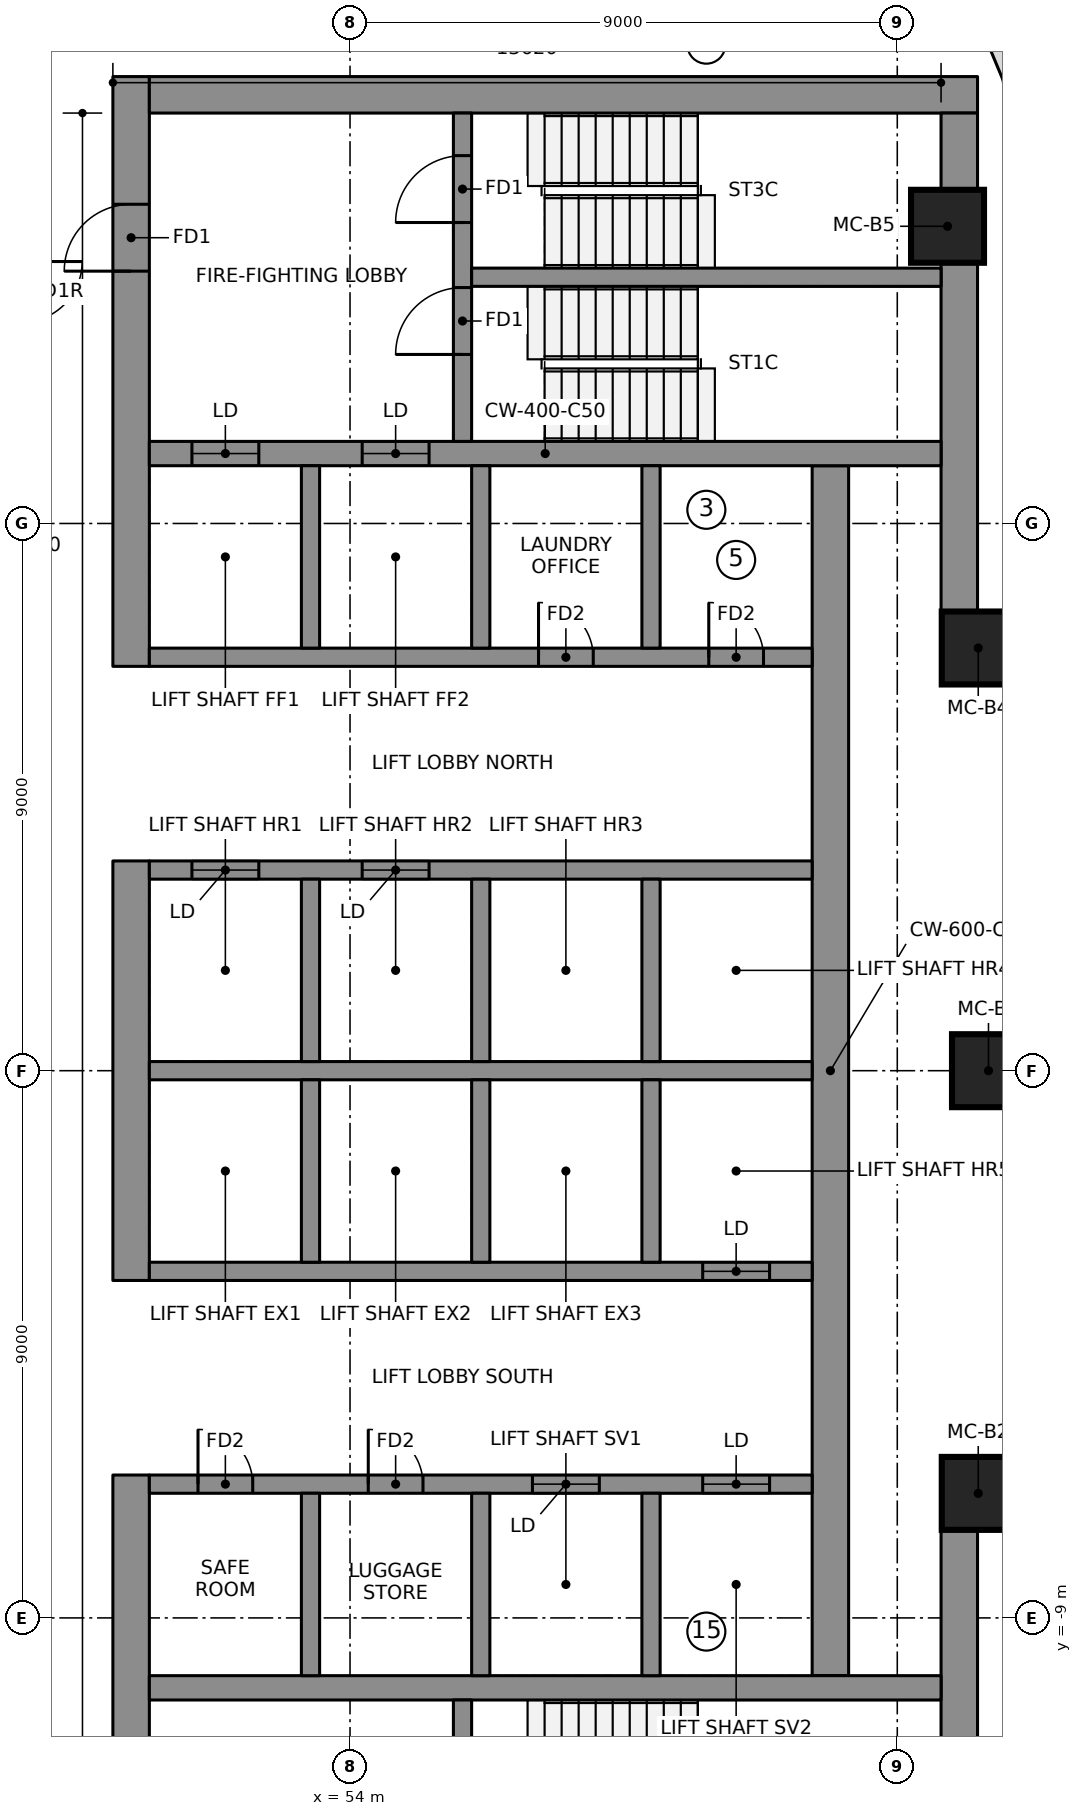
"""IFC4 building model, lengths in metres.
Left out: names, types, materials, properties, quantities, classifications, styles, units other than length and angle.
Written with IfcOpenShell. Run it as: python <this file> out.ifc"""

import sys

from ifc_helpers import new_model, si_unit, direction, frame, frame_2d, origin, origin_2d, place, context, subcontext, project, spatial, polyline, rectangle, outline, extrude, element, fill, save


model = new_model("IFC4")
c1 = context("Model", 3, precision=1e-05, world=origin(), true_north=direction((0.0, 1.0)))
c2 = subcontext(c1, "Body", "Model", "MODEL_VIEW")
j1 = project(units=[si_unit("LENGTHUNIT", "METRE"), si_unit("PLANEANGLEUNIT", "RADIAN")], contexts=[c1])
p1 = place(None, origin())
s1 = spatial("IfcSite", under=j1, at=p1, CompositionType="ELEMENT")
p2 = place(p1, origin())
s2 = spatial("IfcBuilding", under=s1, at=p2, CompositionType="ELEMENT")
p3 = place(p2, frame((0.0, 0.0, 220.8)))
s3 = spatial("IfcBuildingStorey", under=s2, at=p3, CompositionType="ELEMENT", Elevation=220.8)
p4 = place(p3, frame((50.4, 6.65, 0.0), z_axis=(0.0, 0.0, 1.0), x_axis=(0.0, 1.0, 0.0)))
e1 = element("IfcWall", 1, at=p4, inside=s3, PredefinedType="SHEAR", context=c2, shape_type="SweptSolid", body=[
    extrude(rectangle(XDim=9.7, YDim=0.6, at=frame_2d((4.85, 0.0))), origin(), (0.0, 0.0, 1.0), 3.55),
])
p5 = place(p4, frame((6.5, 0.0, 0.0)))
e2 = element("IfcOpeningElement", 2, at=p5, cuts=e1, PredefinedType="OPENING", context=c2, shape_type="SweptSolid", body=[
    extrude(rectangle(XDim=1.1, YDim=2.1, at=frame_2d((0.55, 1.05))), frame((0.0, 0.31, 0.0), z_axis=(0.0, -1.0, 0.0), x_axis=(1.0, 0.0, 0.0)), (0.0, 0.0, 1.0), 0.62),
])
p6 = place(p3, frame((50.4, -3.45, 0.0), z_axis=(0.0, 0.0, 1.0), x_axis=(0.0, 1.0, 0.0)))
e3 = element("IfcWall", 3, at=p6, inside=s3, PredefinedType="SHEAR", context=c2, shape_type="SweptSolid", body=[
    extrude(rectangle(XDim=6.9, YDim=0.6, at=frame_2d((3.45, 0.0))), origin(), (0.0, 0.0, 1.0), 3.55),
])
p7 = place(p3, frame((50.4, -16.35, 0.0), z_axis=(0.0, 0.0, 1.0), x_axis=(0.0, 1.0, 0.0)))
e4 = element("IfcWall", 4, at=p7, inside=s3, PredefinedType="SHEAR", context=c2, shape_type="SweptSolid", body=[
    extrude(rectangle(XDim=9.7, YDim=0.6, at=frame_2d((4.85, 0.0))), origin(), (0.0, 0.0, 1.0), 3.55),
])
p8 = place(p7, frame((2.1, 0.0, 0.0)))
e5 = element("IfcOpeningElement", 5, at=p8, cuts=e4, PredefinedType="OPENING", context=c2, shape_type="SweptSolid", body=[
    extrude(rectangle(XDim=1.1, YDim=2.1, at=frame_2d((0.55, 1.05))), frame((0.0, 0.31, 0.0), z_axis=(0.0, -1.0, 0.0), x_axis=(1.0, 0.0, 0.0)), (0.0, 0.0, 1.0), 0.62),
])
p9 = place(p3, frame((50.7, 16.05, 0.0), z_axis=(0.0, 0.0, 1.0), x_axis=(1.0, 0.0, 0.0)))
e6 = element("IfcWall", 6, at=p9, inside=s3, PredefinedType="SHEAR", context=c2, shape_type="SweptSolid", body=[
    extrude(rectangle(XDim=13.62, YDim=0.6, at=frame_2d((6.81, 0.0))), origin(), (0.0, 0.0, 1.0), 3.55),
])
for number, where, z_axis, x_axis in (
    (7, (64.02, 7.502, 0.0), (0.0, 0.0, 1.0), (0.0, 1.0, 0.0)),
    (8, (64.02, -15.75, 0.0), (0.0, 0.0, 1.0), (0.0, 1.0, 0.0)),
):
    element("IfcWall", number, at=place(p3, frame(where, z_axis=z_axis, x_axis=x_axis)), inside=s3, PredefinedType="SHEAR", context=c2, shape_type="SweptSolid", body=[
        extrude(rectangle(XDim=8.248, YDim=0.6, at=frame_2d((4.124, 0.0))), origin(), (0.0, 0.0, 1.0), 3.55),
    ])
p10 = place(p3, frame((61.9, -9.95, 0.0), z_axis=(0.0, 0.0, 1.0), x_axis=(0.0, 1.0, 0.0)))
e9 = element("IfcWall", 9, at=p10, inside=s3, PredefinedType="SHEAR", context=c2, shape_type="SweptSolid", body=[
    extrude(rectangle(XDim=19.9, YDim=0.6, at=frame_2d((9.95, 0.0))), origin(), (0.0, 0.0, 1.0), 3.55),
])
p11 = place(p3, frame((50.7, 10.15, 0.0), z_axis=(0.0, 0.0, 1.0), x_axis=(1.0, 0.0, 0.0)))
e10 = element("IfcWall", 10, at=p11, inside=s3, PredefinedType="SHEAR", context=c2, shape_type="SweptSolid", body=[
    extrude(rectangle(XDim=13.02, YDim=0.4, at=frame_2d((6.51, 0.0))), origin(), (0.0, 0.0, 1.0), 3.55),
])
p12 = place(p11, frame((0.7, 0.0, 0.0)))
e11 = element("IfcOpeningElement", 11, at=p12, cuts=e10, PredefinedType="OPENING", context=c2, shape_type="SweptSolid", body=[
    extrude(rectangle(XDim=1.1, YDim=2.1, at=frame_2d((0.55, 1.05))), frame((0.0, 0.21, 0.0), z_axis=(0.0, -1.0, 0.0), x_axis=(1.0, 0.0, 0.0)), (0.0, 0.0, 1.0), 0.42),
])
p13 = place(p11, frame((3.5, 0.0, 0.0)))
e12 = element("IfcOpeningElement", 12, at=p13, cuts=e10, PredefinedType="OPENING", context=c2, shape_type="SweptSolid", body=[
    extrude(rectangle(XDim=1.1, YDim=2.1, at=frame_2d((0.55, 1.05))), frame((0.0, 0.21, 0.0), z_axis=(0.0, -1.0, 0.0), x_axis=(1.0, 0.0, 0.0)), (0.0, 0.0, 1.0), 0.42),
])
p14 = place(p3, frame((50.7, -10.15, 0.0), z_axis=(0.0, 0.0, 1.0), x_axis=(1.0, 0.0, 0.0)))
e13 = element("IfcWall", 13, at=p14, inside=s3, PredefinedType="SHEAR", context=c2, shape_type="SweptSolid", body=[
    extrude(rectangle(XDim=13.02, YDim=0.4, at=frame_2d((6.51, 0.0))), origin(), (0.0, 0.0, 1.0), 3.55),
])
p15 = place(p3, frame((50.7, 0.0, 0.0), z_axis=(0.0, 0.0, 1.0), x_axis=(1.0, 0.0, 0.0)))
e14 = element("IfcWall", 14, at=p15, inside=s3, PredefinedType="SHEAR", context=c2, shape_type="SweptSolid", body=[
    extrude(rectangle(XDim=10.9, YDim=0.3, at=frame_2d((5.45, 0.0))), origin(), (0.0, 0.0, 1.0), 3.55),
])
p16 = place(p3, frame((50.7, 3.3, 0.0), z_axis=(0.0, 0.0, 1.0), x_axis=(1.0, 0.0, 0.0)))
e15 = element("IfcWall", 15, at=p16, inside=s3, PredefinedType="SHEAR", context=c2, shape_type="SweptSolid", body=[
    extrude(rectangle(XDim=10.9, YDim=0.3, at=frame_2d((5.45, 0.0))), origin(), (0.0, 0.0, 1.0), 3.55),
])
p17 = place(p16, frame((0.7, 0.0, 0.0)))
e16 = element("IfcOpeningElement", 16, at=p17, cuts=e15, PredefinedType="OPENING", context=c2, shape_type="SweptSolid", body=[
    extrude(rectangle(XDim=1.1, YDim=2.1, at=frame_2d((0.55, 1.05))), frame((0.0, 0.16, 0.0), z_axis=(0.0, -1.0, 0.0), x_axis=(1.0, 0.0, 0.0)), (0.0, 0.0, 1.0), 0.32),
])
p18 = place(p16, frame((3.5, 0.0, 0.0)))
e17 = element("IfcOpeningElement", 17, at=p18, cuts=e15, PredefinedType="OPENING", context=c2, shape_type="SweptSolid", body=[
    extrude(rectangle(XDim=1.1, YDim=2.1, at=frame_2d((0.55, 1.05))), frame((0.0, 0.16, 0.0), z_axis=(0.0, -1.0, 0.0), x_axis=(1.0, 0.0, 0.0)), (0.0, 0.0, 1.0), 0.32),
])
p19 = place(p3, frame((50.7, 6.8, 0.0), z_axis=(0.0, 0.0, 1.0), x_axis=(1.0, 0.0, 0.0)))
e18 = element("IfcWall", 18, at=p19, inside=s3, PredefinedType="SHEAR", context=c2, shape_type="SweptSolid", body=[
    extrude(rectangle(XDim=10.9, YDim=0.3, at=frame_2d((5.45, 0.0))), origin(), (0.0, 0.0, 1.0), 3.55),
])
p20 = place(p19, frame((6.4, 0.0, 0.0)))
e19 = element("IfcOpeningElement", 19, at=p20, cuts=e18, PredefinedType="OPENING", context=c2, shape_type="SweptSolid", body=[
    extrude(rectangle(XDim=0.9, YDim=2.1, at=frame_2d((0.45, 1.05))), frame((0.0, 0.16, 0.0), z_axis=(0.0, -1.0, 0.0), x_axis=(1.0, 0.0, 0.0)), (0.0, 0.0, 1.0), 0.32),
])
p21 = place(p19, frame((9.2, 0.0, 0.0)))
e20 = element("IfcOpeningElement", 20, at=p21, cuts=e18, PredefinedType="OPENING", context=c2, shape_type="SweptSolid", body=[
    extrude(rectangle(XDim=0.9, YDim=2.1, at=frame_2d((0.45, 1.05))), frame((0.0, 0.16, 0.0), z_axis=(0.0, -1.0, 0.0), x_axis=(1.0, 0.0, 0.0)), (0.0, 0.0, 1.0), 0.32),
])
for number, where, z_axis, x_axis in (
    (21, (53.35, 0.15, 0.0), (0.0, 0.0, 1.0), (0.0, 1.0, 0.0)),
    (22, (53.35, 6.95, 0.0), (0.0, 0.0, 1.0), (0.0, 1.0, 0.0)),
    (23, (56.15, 0.15, 0.0), (0.0, 0.0, 1.0), (0.0, 1.0, 0.0)),
    (24, (56.15, 6.95, 0.0), (0.0, 0.0, 1.0), (0.0, 1.0, 0.0)),
    (25, (58.95, 0.15, 0.0), (0.0, 0.0, 1.0), (0.0, 1.0, 0.0)),
    (26, (58.95, 6.95, 0.0), (0.0, 0.0, 1.0), (0.0, 1.0, 0.0)),
):
    element("IfcWall", number, at=place(p3, frame(where, z_axis=z_axis, x_axis=x_axis)), inside=s3, PredefinedType="SHEAR", context=c2, shape_type="SweptSolid", body=[
        extrude(rectangle(XDim=3.0, YDim=0.3, at=frame_2d((1.5, 0.0))), origin(), (0.0, 0.0, 1.0), 3.55),
    ])
p22 = place(p3, frame((50.7, -3.3, 0.0), z_axis=(0.0, 0.0, 1.0), x_axis=(1.0, 0.0, 0.0)))
e27 = element("IfcWall", 27, at=p22, inside=s3, PredefinedType="SHEAR", context=c2, shape_type="SweptSolid", body=[
    extrude(rectangle(XDim=10.9, YDim=0.3, at=frame_2d((5.45, 0.0))), origin(), (0.0, 0.0, 1.0), 3.55),
])
p23 = place(p22, frame((9.1, 0.0, 0.0)))
e28 = element("IfcOpeningElement", 28, at=p23, cuts=e27, PredefinedType="OPENING", context=c2, shape_type="SweptSolid", body=[
    extrude(rectangle(XDim=1.1, YDim=2.1, at=frame_2d((0.55, 1.05))), frame((0.0, 0.16, 0.0), z_axis=(0.0, -1.0, 0.0), x_axis=(1.0, 0.0, 0.0)), (0.0, 0.0, 1.0), 0.32),
])
p24 = place(p3, frame((50.7, -6.8, 0.0), z_axis=(0.0, 0.0, 1.0), x_axis=(1.0, 0.0, 0.0)))
e29 = element("IfcWall", 29, at=p24, inside=s3, PredefinedType="SHEAR", context=c2, shape_type="SweptSolid", body=[
    extrude(rectangle(XDim=10.9, YDim=0.3, at=frame_2d((5.45, 0.0))), origin(), (0.0, 0.0, 1.0), 3.55),
])
p25 = place(p24, frame((6.3, 0.0, 0.0)))
e30 = element("IfcOpeningElement", 30, at=p25, cuts=e29, PredefinedType="OPENING", context=c2, shape_type="SweptSolid", body=[
    extrude(rectangle(XDim=1.1, YDim=2.1, at=frame_2d((0.55, 1.05))), frame((0.0, 0.16, 0.0), z_axis=(0.0, -1.0, 0.0), x_axis=(1.0, 0.0, 0.0)), (0.0, 0.0, 1.0), 0.32),
])
p26 = place(p24, frame((9.1, 0.0, 0.0)))
e31 = element("IfcOpeningElement", 31, at=p26, cuts=e29, PredefinedType="OPENING", context=c2, shape_type="SweptSolid", body=[
    extrude(rectangle(XDim=1.1, YDim=2.1, at=frame_2d((0.55, 1.05))), frame((0.0, 0.16, 0.0), z_axis=(0.0, -1.0, 0.0), x_axis=(1.0, 0.0, 0.0)), (0.0, 0.0, 1.0), 0.32),
])
p27 = place(p24, frame((0.8, 0.0, 0.0)))
e32 = element("IfcOpeningElement", 32, at=p27, cuts=e29, PredefinedType="OPENING", context=c2, shape_type="SweptSolid", body=[
    extrude(rectangle(XDim=0.9, YDim=2.1, at=frame_2d((0.45, 1.05))), frame((0.0, 0.16, 0.0), z_axis=(0.0, -1.0, 0.0), x_axis=(1.0, 0.0, 0.0)), (0.0, 0.0, 1.0), 0.32),
])
p28 = place(p24, frame((3.6, 0.0, 0.0)))
e33 = element("IfcOpeningElement", 33, at=p28, cuts=e29, PredefinedType="OPENING", context=c2, shape_type="SweptSolid", body=[
    extrude(rectangle(XDim=0.9, YDim=2.1, at=frame_2d((0.45, 1.05))), frame((0.0, 0.16, 0.0), z_axis=(0.0, -1.0, 0.0), x_axis=(1.0, 0.0, 0.0)), (0.0, 0.0, 1.0), 0.32),
])
for number, where, z_axis, x_axis in (
    (34, (53.35, -3.15, 0.0), (0.0, 0.0, 1.0), (0.0, 1.0, 0.0)),
    (35, (53.35, -9.95, 0.0), (0.0, 0.0, 1.0), (0.0, 1.0, 0.0)),
    (36, (56.15, -3.15, 0.0), (0.0, 0.0, 1.0), (0.0, 1.0, 0.0)),
    (37, (56.15, -9.95, 0.0), (0.0, 0.0, 1.0), (0.0, 1.0, 0.0)),
    (38, (58.95, -3.15, 0.0), (0.0, 0.0, 1.0), (0.0, 1.0, 0.0)),
    (39, (58.95, -9.95, 0.0), (0.0, 0.0, 1.0), (0.0, 1.0, 0.0)),
):
    element("IfcWall", number, at=place(p3, frame(where, z_axis=z_axis, x_axis=x_axis)), inside=s3, PredefinedType="SHEAR", context=c2, shape_type="SweptSolid", body=[
        extrude(rectangle(XDim=3.0, YDim=0.3, at=frame_2d((1.5, 0.0))), origin(), (0.0, 0.0, 1.0), 3.55),
    ])
p29 = place(p3, frame((55.85, 10.35, 0.0), z_axis=(0.0, 0.0, 1.0), x_axis=(0.0, 1.0, 0.0)))
e40 = element("IfcWall", 40, at=p29, inside=s3, PredefinedType="SHEAR", context=c2, shape_type="SweptSolid", body=[
    extrude(rectangle(XDim=5.4, YDim=0.3, at=frame_2d((2.7, 0.0))), origin(), (0.0, 0.0, 1.0), 3.55),
])
p30 = place(p29, frame((1.43, 0.0, 0.0)))
e41 = element("IfcOpeningElement", 41, at=p30, cuts=e40, PredefinedType="OPENING", context=c2, shape_type="SweptSolid", body=[
    extrude(rectangle(XDim=1.1, YDim=2.1, at=frame_2d((0.55, 1.05))), frame((0.0, 0.16, 0.0), z_axis=(0.0, -1.0, 0.0), x_axis=(1.0, 0.0, 0.0)), (0.0, 0.0, 1.0), 0.32),
])
p31 = place(p29, frame((3.6, 0.0, 0.0)))
e42 = element("IfcOpeningElement", 42, at=p31, cuts=e40, PredefinedType="OPENING", context=c2, shape_type="SweptSolid", body=[
    extrude(rectangle(XDim=1.1, YDim=2.1, at=frame_2d((0.55, 1.05))), frame((0.0, 0.16, 0.0), z_axis=(0.0, -1.0, 0.0), x_axis=(1.0, 0.0, 0.0)), (0.0, 0.0, 1.0), 0.32),
])
p32 = place(p3, frame((55.85, -15.75, 0.0), z_axis=(0.0, 0.0, 1.0), x_axis=(0.0, 1.0, 0.0)))
e43 = element("IfcWall", 43, at=p32, inside=s3, PredefinedType="SHEAR", context=c2, shape_type="SweptSolid", body=[
    extrude(rectangle(XDim=5.4, YDim=0.3, at=frame_2d((2.7, 0.0))), origin(), (0.0, 0.0, 1.0), 3.55),
])
p33 = place(p32, frame((3.6, 0.0, 0.0)))
e44 = element("IfcOpeningElement", 44, at=p33, cuts=e43, PredefinedType="OPENING", context=c2, shape_type="SweptSolid", body=[
    extrude(rectangle(XDim=1.1, YDim=2.1, at=frame_2d((0.55, 1.05))), frame((0.0, 0.16, 0.0), z_axis=(0.0, -1.0, 0.0), x_axis=(1.0, 0.0, 0.0)), (0.0, 0.0, 1.0), 0.32),
])
p34 = place(p32, frame((0.8, 0.0, 0.0)))
e45 = element("IfcOpeningElement", 45, at=p34, cuts=e43, PredefinedType="OPENING", context=c2, shape_type="SweptSolid", body=[
    extrude(rectangle(XDim=0.9, YDim=2.1, at=frame_2d((0.45, 1.05))), frame((0.0, 0.16, 0.0), z_axis=(0.0, -1.0, 0.0), x_axis=(1.0, 0.0, 0.0)), (0.0, 0.0, 1.0), 0.32),
])
p35 = place(p3, frame((56.0, 13.05, 0.0), z_axis=(0.0, 0.0, 1.0), x_axis=(1.0, 0.0, 0.0)))
e46 = element("IfcWall", 46, at=p35, inside=s3, PredefinedType="SHEAR", context=c2, shape_type="SweptSolid", body=[
    extrude(rectangle(XDim=7.72, YDim=0.3, at=frame_2d((3.86, 0.0))), origin(), (0.0, 0.0, 1.0), 3.55),
])
for number, where, z_axis, x_axis in (
    (47, (64.332, -6.952, 0.0), (0.0, 0.0, 1.0), (1.0, 0.0, 0.0)),
    (48, (64.5, 0.0, 0.0), (0.0, 0.0, 1.0), (1.0, 0.0, 0.0)),
    (49, (64.332, 6.952, 0.0), (0.0, 0.0, 1.0), (1.0, 0.0, 0.0)),
    (50, (63.826, 13.888, 0.0), (0.0, 0.0, 1.0), (1.0, 0.0, 0.0)),
):
    element("IfcColumn", number, at=place(p3, frame(where, z_axis=z_axis, x_axis=x_axis)), inside=s3, PredefinedType="COLUMN", context=c2, shape_type="SweptSolid", body=[
        extrude(rectangle(XDim=1.2, YDim=1.2, at=origin_2d()), origin(), (0.0, 0.0, 1.0), 3.55),
    ])
p36 = place(p3, frame((64.938, 16.337, 0.0), z_axis=(0.0, 0.0, 1.0), x_axis=(-0.3844335483, 0.923152667191, 0.0)))
e51 = element("IfcWall", 51, at=p36, inside=s3, PredefinedType="NOTDEFINED", context=c2, shape_type="SweptSolid", body=[
    extrude(outline(polyline([(-0.03, -0.2), (3.871, -0.2), (3.756, 0.2), (0.03, 0.2), (-0.03, -0.2)])), origin(), (0.0, 0.0, 1.0), 3.25),
])
p37 = place(p12, origin())
e52 = element("IfcDoor", 52, at=p37, inside=s3, OperationType="DOUBLE_DOOR_SLIDING", PredefinedType="DOOR", context=c2, shape_type="SweptSolid", body=[
    extrude(rectangle(XDim=1.1, YDim=2.1, at=frame_2d((0.55, 1.05))), frame((0.0, 0.025, 0.0), z_axis=(0.0, -1.0, 0.0), x_axis=(1.0, 0.0, 0.0)), (0.0, 0.0, 1.0), 0.05),
])
fill(e11, e52)
p38 = place(p13, origin())
e53 = element("IfcDoor", 53, at=p38, inside=s3, OperationType="DOUBLE_DOOR_SLIDING", PredefinedType="DOOR", context=c2, shape_type="SweptSolid", body=[
    extrude(rectangle(XDim=1.1, YDim=2.1, at=frame_2d((0.55, 1.05))), frame((0.0, 0.025, 0.0), z_axis=(0.0, -1.0, 0.0), x_axis=(1.0, 0.0, 0.0)), (0.0, 0.0, 1.0), 0.05),
])
fill(e12, e53)
p39 = place(p17, origin())
e54 = element("IfcDoor", 54, at=p39, inside=s3, OperationType="DOUBLE_DOOR_SLIDING", PredefinedType="DOOR", context=c2, shape_type="SweptSolid", body=[
    extrude(rectangle(XDim=1.1, YDim=2.1, at=frame_2d((0.55, 1.05))), frame((0.0, 0.025, 0.0), z_axis=(0.0, -1.0, 0.0), x_axis=(1.0, 0.0, 0.0)), (0.0, 0.0, 1.0), 0.05),
])
fill(e16, e54)
p40 = place(p18, origin())
e55 = element("IfcDoor", 55, at=p40, inside=s3, OperationType="DOUBLE_DOOR_SLIDING", PredefinedType="DOOR", context=c2, shape_type="SweptSolid", body=[
    extrude(rectangle(XDim=1.1, YDim=2.1, at=frame_2d((0.55, 1.05))), frame((0.0, 0.025, 0.0), z_axis=(0.0, -1.0, 0.0), x_axis=(1.0, 0.0, 0.0)), (0.0, 0.0, 1.0), 0.05),
])
fill(e17, e55)
p41 = place(p23, origin())
e56 = element("IfcDoor", 56, at=p41, inside=s3, OperationType="DOUBLE_DOOR_SLIDING", PredefinedType="DOOR", context=c2, shape_type="SweptSolid", body=[
    extrude(rectangle(XDim=1.1, YDim=2.1, at=frame_2d((0.55, 1.05))), frame((0.0, 0.025, 0.0), z_axis=(0.0, -1.0, 0.0), x_axis=(1.0, 0.0, 0.0)), (0.0, 0.0, 1.0), 0.05),
])
fill(e28, e56)
p42 = place(p25, origin())
e57 = element("IfcDoor", 57, at=p42, inside=s3, OperationType="DOUBLE_DOOR_SLIDING", PredefinedType="DOOR", context=c2, shape_type="SweptSolid", body=[
    extrude(rectangle(XDim=1.1, YDim=2.1, at=frame_2d((0.55, 1.05))), frame((0.0, 0.025, 0.0), z_axis=(0.0, -1.0, 0.0), x_axis=(1.0, 0.0, 0.0)), (0.0, 0.0, 1.0), 0.05),
])
fill(e30, e57)
p43 = place(p26, origin())
e58 = element("IfcDoor", 58, at=p43, inside=s3, OperationType="DOUBLE_DOOR_SLIDING", PredefinedType="DOOR", context=c2, shape_type="SweptSolid", body=[
    extrude(rectangle(XDim=1.1, YDim=2.1, at=frame_2d((0.55, 1.05))), frame((0.0, 0.025, 0.0), z_axis=(0.0, -1.0, 0.0), x_axis=(1.0, 0.0, 0.0)), (0.0, 0.0, 1.0), 0.05),
])
fill(e31, e58)
p44 = place(p30, origin())
e59 = element("IfcDoor", 59, at=p44, inside=s3, OperationType="SINGLE_SWING_RIGHT", PredefinedType="DOOR", context=c2, shape_type="SweptSolid", body=[
    extrude(rectangle(XDim=1.1, YDim=2.1, at=frame_2d((0.55, 1.05))), frame((0.0, 0.025, 0.0), z_axis=(0.0, -1.0, 0.0), x_axis=(1.0, 0.0, 0.0)), (0.0, 0.0, 1.0), 0.05),
])
fill(e41, e59)
p45 = place(p31, origin())
e60 = element("IfcDoor", 60, at=p45, inside=s3, OperationType="SINGLE_SWING_RIGHT", PredefinedType="DOOR", context=c2, shape_type="SweptSolid", body=[
    extrude(rectangle(XDim=1.1, YDim=2.1, at=frame_2d((0.55, 1.05))), frame((0.0, 0.025, 0.0), z_axis=(0.0, -1.0, 0.0), x_axis=(1.0, 0.0, 0.0)), (0.0, 0.0, 1.0), 0.05),
])
fill(e42, e60)
p46 = place(p5, origin())
e61 = element("IfcDoor", 61, at=p46, inside=s3, OperationType="SINGLE_SWING_RIGHT", PredefinedType="DOOR", context=c2, shape_type="SweptSolid", body=[
    extrude(rectangle(XDim=1.1, YDim=2.1, at=frame_2d((0.55, 1.05))), frame((0.0, 0.025, 0.0), z_axis=(0.0, -1.0, 0.0), x_axis=(1.0, 0.0, 0.0)), (0.0, 0.0, 1.0), 0.05),
])
fill(e2, e61)
p47 = place(p20, origin())
e62 = element("IfcDoor", 62, at=p47, inside=s3, OperationType="SINGLE_SWING_LEFT", PredefinedType="DOOR", context=c2, shape_type="SweptSolid", body=[
    extrude(rectangle(XDim=0.9, YDim=2.1, at=frame_2d((0.45, 1.05))), frame((0.0, 0.025, 0.0), z_axis=(0.0, -1.0, 0.0), x_axis=(1.0, 0.0, 0.0)), (0.0, 0.0, 1.0), 0.05),
])
fill(e19, e62)
p48 = place(p21, origin())
e63 = element("IfcDoor", 63, at=p48, inside=s3, OperationType="SINGLE_SWING_LEFT", PredefinedType="DOOR", context=c2, shape_type="SweptSolid", body=[
    extrude(rectangle(XDim=0.9, YDim=2.1, at=frame_2d((0.45, 1.05))), frame((0.0, 0.025, 0.0), z_axis=(0.0, -1.0, 0.0), x_axis=(1.0, 0.0, 0.0)), (0.0, 0.0, 1.0), 0.05),
])
fill(e20, e63)
p49 = place(p27, origin())
e64 = element("IfcDoor", 64, at=p49, inside=s3, OperationType="SINGLE_SWING_LEFT", PredefinedType="DOOR", context=c2, shape_type="SweptSolid", body=[
    extrude(rectangle(XDim=0.9, YDim=2.1, at=frame_2d((0.45, 1.05))), frame((0.0, 0.025, 0.0), z_axis=(0.0, -1.0, 0.0), x_axis=(1.0, 0.0, 0.0)), (0.0, 0.0, 1.0), 0.05),
])
fill(e32, e64)
p50 = place(p28, origin())
e65 = element("IfcDoor", 65, at=p50, inside=s3, OperationType="SINGLE_SWING_LEFT", PredefinedType="DOOR", context=c2, shape_type="SweptSolid", body=[
    extrude(rectangle(XDim=0.9, YDim=2.1, at=frame_2d((0.45, 1.05))), frame((0.0, 0.025, 0.0), z_axis=(0.0, -1.0, 0.0), x_axis=(1.0, 0.0, 0.0)), (0.0, 0.0, 1.0), 0.05),
])
fill(e33, e65)
save(model, sys.argv[1])
